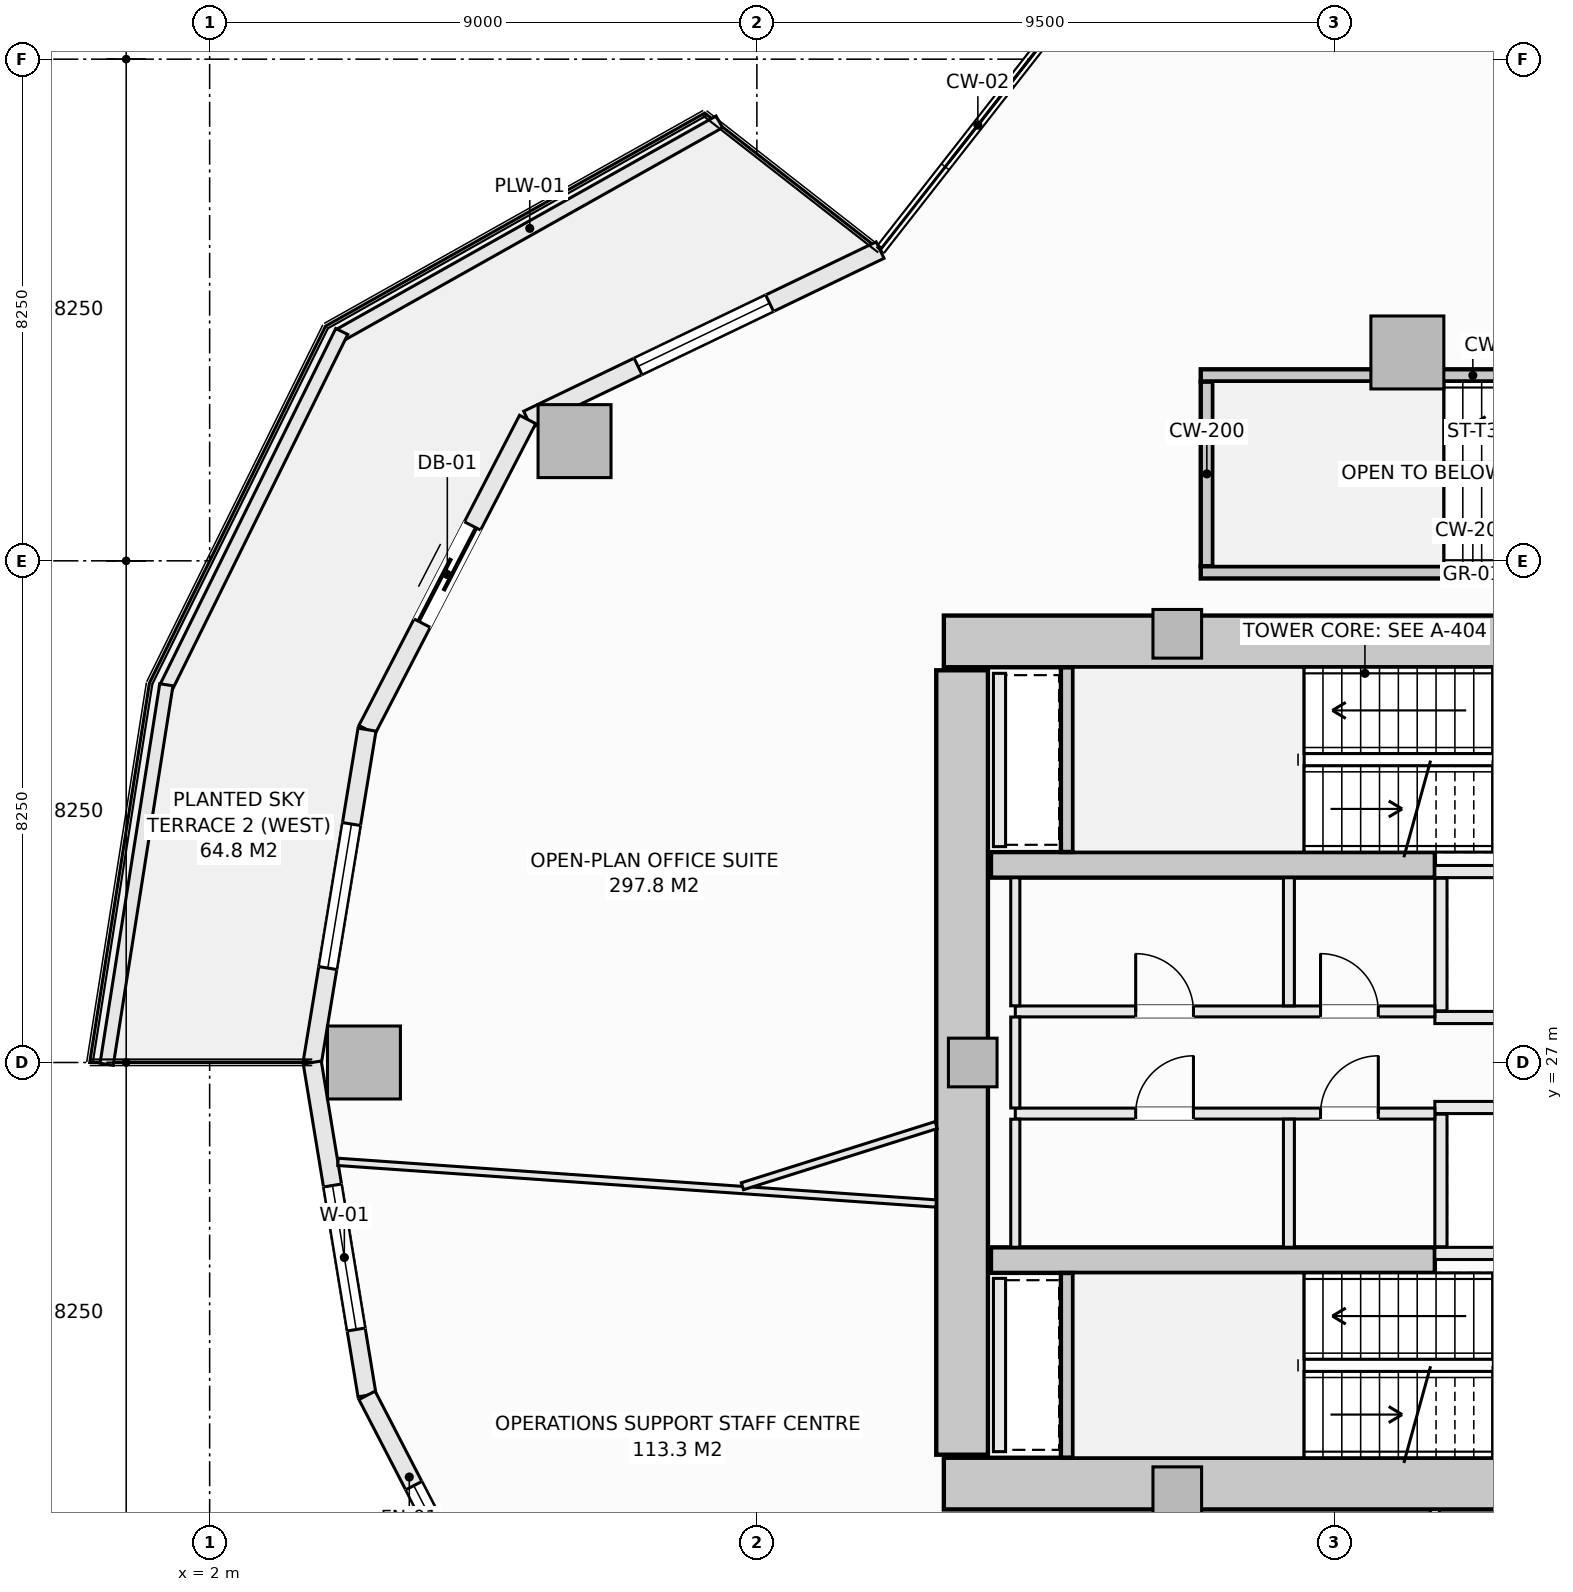
"""IFC4 building model, lengths in metres.
Left out: names, types, materials, properties, quantities, classifications, styles, units other than length and angle.
Written with IfcOpenShell. Run it as: python <this file> out.ifc"""

import sys

from ifc_helpers import new_model, si_unit, direction, frame, frame_2d, origin, origin_2d, place, context, subcontext, project, spatial, rectangle, extrude, element, fill, save


model = new_model("IFC4")
c1 = context("Model", 3, precision=1e-05, world=origin(), true_north=direction((0.0, 1.0)))
c2 = subcontext(c1, "Body", "Model", "MODEL_VIEW")
j1 = project(units=[si_unit("LENGTHUNIT", "METRE"), si_unit("PLANEANGLEUNIT", "RADIAN")], contexts=[c1])
p1 = place(None, origin())
s1 = spatial("IfcSite", under=j1, at=p1, CompositionType="ELEMENT")
p2 = place(p1, origin())
s2 = spatial("IfcBuilding", under=s1, at=p2, CompositionType="ELEMENT")
p3 = place(p2, frame((0.0, 0.0, 84.25)))
s3 = spatial("IfcBuildingStorey", under=s2, at=p3, CompositionType="ELEMENT", Elevation=84.25)
for number, where, z_axis, x_axis in (
    (1, (14.075, 33.925, -0.28), (0.0, 0.0, 1.0), (1.0, 0.0, 0.0)),
    (2, (14.075, 20.075, -0.28), (0.0, 0.0, 1.0), (1.0, 0.0, 0.0)),
):
    element("IfcWall", number, at=place(p3, frame(where, z_axis=z_axis, x_axis=x_axis)), inside=s3, PredefinedType="SHEAR", context=c2, shape_type="SweptSolid", body=[
        extrude(rectangle(XDim=13.85, YDim=0.85, at=frame_2d((6.925, 0.0))), origin(), (0.0, 0.0, 1.0), 3.85),
    ])
p4 = place(p3, frame((14.375, 20.55, -0.28), z_axis=(0.0, 0.0, 1.0), x_axis=(0.0, 1.0, 0.0)))
e3 = element("IfcWall", 3, at=p4, inside=s3, PredefinedType="SHEAR", context=c2, shape_type="SweptSolid", body=[
    extrude(rectangle(XDim=12.9, YDim=0.85, at=frame_2d((6.45, 0.0))), origin(), (0.0, 0.0, 1.0), 3.85),
])
for number, where, z_axis, x_axis in (
    (4, (14.85, 30.25, -0.28), (0.0, 0.0, 1.0), (1.0, 0.0, 0.0)),
    (5, (14.85, 23.75, -0.28), (0.0, 0.0, 1.0), (1.0, 0.0, 0.0)),
):
    element("IfcWall", number, at=place(p3, frame(where, z_axis=z_axis, x_axis=x_axis)), inside=s3, PredefinedType="SHEAR", context=c2, shape_type="SweptSolid", body=[
        extrude(rectangle(XDim=7.3, YDim=0.42, at=frame_2d((3.65, 0.0))), origin(), (0.0, 0.0, 1.0), 3.85),
    ])
for number, where, z_axis, x_axis in (
    (6, (8.001, 37.219, -0.28), (0.0, 0.0, 1.0), (1.0, 0.0, 0.0)),
    (7, (4.538, 27.0, -0.28), (0.0, 0.0, 1.0), (1.0, 0.0, 0.0)),
    (8, (21.698, 38.677, -0.28), (0.0, 0.0, 1.0), (1.0, 0.0, 0.0)),
):
    element("IfcColumn", number, at=place(p3, frame(where, z_axis=z_axis, x_axis=x_axis)), inside=s3, PredefinedType="COLUMN", context=c2, shape_type="SweptSolid", body=[
        extrude(rectangle(XDim=1.2, YDim=1.2, at=origin_2d()), origin(), (0.0, 0.0, 1.0), 3.85),
    ])
for number, where, z_axis, x_axis in (
    (9, (17.914, 34.05, -0.28), (0.0, 0.0, 1.0), (1.0, 0.0, 0.0)),
    (10, (14.55, 27.0, -0.28), (0.0, 0.0, 1.0), (1.0, 0.0, 0.0)),
    (11, (17.914, 19.95, -0.28), (0.0, 0.0, 1.0), (1.0, 0.0, 0.0)),
):
    element("IfcColumn", number, at=place(p3, frame(where, z_axis=z_axis, x_axis=x_axis)), inside=s3, PredefinedType="PILASTER", context=c2, shape_type="SweptSolid", body=[
        extrude(rectangle(XDim=0.8, YDim=0.8, at=origin_2d()), origin(), (0.0, 0.0, 1.0), 3.85),
    ])
p5 = place(p3, frame((7.229, 37.575, 0.0), z_axis=(0.0, 0.0, 1.0), x_axis=(0.901354747727, 0.433081538224, 0.0)))
e12 = element("IfcWall", 12, at=p5, inside=s3, PredefinedType="SOLIDWALL", context=c2, shape_type="SweptSolid", body=[
    extrude(rectangle(XDim=6.431, YDim=0.3, at=frame_2d((3.215, 0.0))), origin(), (0.0, 0.0, 1.0), 3.093),
])
p6 = place(p5, frame((2.015, 0.0, 0.85)))
e13 = element("IfcOpeningElement", 13, at=p6, cuts=e12, PredefinedType="OPENING", context=c2, shape_type="SweptSolid", body=[
    extrude(rectangle(XDim=2.4, YDim=1.9, at=frame_2d((1.2, 0.95))), frame((0.0, 0.16, 0.0), z_axis=(0.0, -1.0, 0.0), x_axis=(1.0, 0.0, 0.0)), (0.0, 0.0, 1.0), 0.32),
])
p7 = place(p3, frame((4.588, 32.474, 0.0), z_axis=(0.0, 0.0, 1.0), x_axis=(0.459800981414, 0.888021991558, 0.0)))
e14 = element("IfcWall", 14, at=p7, inside=s3, PredefinedType="SOLIDWALL", context=c2, shape_type="SweptSolid", body=[
    extrude(rectangle(XDim=5.744, YDim=0.3, at=frame_2d((2.872, 0.0))), origin(), (0.0, 0.0, 1.0), 3.093),
])
p8 = place(p7, frame((1.972, 0.0, 0.0)))
e15 = element("IfcOpeningElement", 15, at=p8, cuts=e14, PredefinedType="OPENING", context=c2, shape_type="SweptSolid", body=[
    extrude(rectangle(XDim=1.8, YDim=2.25, at=frame_2d((0.9, 1.125))), frame((0.0, 0.16, 0.0), z_axis=(0.0, -1.0, 0.0), x_axis=(1.0, 0.0, 0.0)), (0.0, 0.0, 1.0), 0.32),
])
p9 = place(p3, frame((3.688, 27.0, 0.0), z_axis=(0.0, 0.0, 1.0), x_axis=(0.162386212206, 0.986727276447, 0.0)))
e16 = element("IfcWall", 16, at=p9, inside=s3, PredefinedType="SOLIDWALL", context=c2, shape_type="SweptSolid", body=[
    extrude(rectangle(XDim=5.548, YDim=0.3, at=frame_2d((2.774, 0.0))), origin(), (0.0, 0.0, 1.0), 3.093),
])
p10 = place(p9, frame((1.574, 0.0, 0.85)))
e17 = element("IfcOpeningElement", 17, at=p10, cuts=e16, PredefinedType="OPENING", context=c2, shape_type="SweptSolid", body=[
    extrude(rectangle(XDim=2.4, YDim=1.9, at=frame_2d((1.2, 0.95))), frame((0.0, 0.16, 0.0), z_axis=(0.0, -1.0, 0.0), x_axis=(1.0, 0.0, 0.0)), (0.0, 0.0, 1.0), 0.32),
])
p11 = place(p3, frame((3.688, 27.0, 0.0), z_axis=(0.0, 0.0, 1.0), x_axis=(0.162386212206, -0.986727276447, 0.0)))
e18 = element("IfcWall", 18, at=p11, inside=s3, PredefinedType="SOLIDWALL", context=c2, shape_type="SweptSolid", body=[
    extrude(rectangle(XDim=5.548, YDim=0.3, at=frame_2d((2.774, 0.0))), origin(), (0.0, 0.0, 1.0), 3.093),
])
p12 = place(p11, frame((2.05, 0.0, 0.85)))
e19 = element("IfcOpeningElement", 19, at=p12, cuts=e18, PredefinedType="OPENING", context=c2, shape_type="SweptSolid", body=[
    extrude(rectangle(XDim=2.4, YDim=1.9, at=frame_2d((1.2, 0.95))), frame((0.0, 0.16, 0.0), z_axis=(0.0, -1.0, 0.0), x_axis=(1.0, 0.0, 0.0)), (0.0, 0.0, 1.0), 0.32),
])
p13 = place(p3, frame((4.588, 21.526, 0.0), z_axis=(0.0, 0.0, 1.0), x_axis=(0.459800981414, -0.888021991558, 0.0)))
e20 = element("IfcWall", 20, at=p13, inside=s3, PredefinedType="SOLIDWALL", context=c2, shape_type="SweptSolid", body=[
    extrude(rectangle(XDim=5.744, YDim=0.3, at=frame_2d((2.872, 0.0))), origin(), (0.0, 0.0, 1.0), 3.093),
])
p14 = place(p13, frame((1.672, 0.0, 0.85)))
e21 = element("IfcOpeningElement", 21, at=p14, cuts=e20, PredefinedType="OPENING", context=c2, shape_type="SweptSolid", body=[
    extrude(rectangle(XDim=2.4, YDim=1.9, at=frame_2d((1.2, 0.95))), frame((0.0, 0.16, 0.0), z_axis=(0.0, -1.0, 0.0), x_axis=(1.0, 0.0, 0.0)), (0.0, 0.0, 1.0), 0.32),
])
p15 = place(p3, frame((4.147, 38.966, 0.0), z_axis=(0.0, 0.0, 1.0), x_axis=(0.871775109335, 0.489906275468, 0.0)))
e22 = element("IfcWall", 22, at=p15, inside=s3, PredefinedType="PARAPET", context=c2, shape_type="SweptSolid", body=[
    extrude(rectangle(XDim=7.152, YDim=0.22, at=frame_2d((3.576, 0.0))), origin(), (0.0, 0.0, 1.0), 0.52),
])
p16 = place(p3, frame((1.275, 33.153, 0.0), z_axis=(0.0, 0.0, 1.0), x_axis=(0.442686636348, 0.89667638644, 0.0)))
e23 = element("IfcWall", 23, at=p16, inside=s3, PredefinedType="PARAPET", context=c2, shape_type="SweptSolid", body=[
    extrude(rectangle(XDim=6.545, YDim=0.22, at=frame_2d((3.272, 0.0))), origin(), (0.0, 0.0, 1.0), 0.52),
])
p17 = place(p3, frame((0.306, 26.971, 0.0), z_axis=(0.0, 0.0, 1.0), x_axis=(0.15545655238, 0.987842730561, 0.0)))
e24 = element("IfcWall", 24, at=p17, inside=s3, PredefinedType="PARAPET", context=c2, shape_type="SweptSolid", body=[
    extrude(rectangle(XDim=6.318, YDim=0.22, at=frame_2d((3.159, 0.0))), origin(), (0.0, 0.0, 1.0), 0.52),
])
for number, where, z_axis, x_axis in (
    (25, (16.1, 30.462, -0.28), (0.0, 0.0, 1.0), (0.0, 1.0, 0.0)),
    (26, (16.1, 20.502, -0.28), (0.0, 0.0, 1.0), (0.0, 1.0, 0.0)),
):
    element("IfcWall", number, at=place(p3, frame(where, z_axis=z_axis, x_axis=x_axis)), inside=s3, PredefinedType="SHEAR", context=c2, shape_type="SweptSolid", body=[
        extrude(rectangle(XDim=3.036, YDim=0.2, at=frame_2d((1.518, 0.0))), origin(), (0.0, 0.0, 1.0), 3.85),
    ])
p18 = place(p3, frame((18.4, 35.16, -0.28), z_axis=(0.0, 0.0, 1.0), x_axis=(0.0, 1.0, 0.0)))
e27 = element("IfcWall", 27, at=p18, inside=s3, PredefinedType="SHEAR", context=c2, shape_type="SweptSolid", body=[
    extrude(rectangle(XDim=3.04, YDim=0.2, at=frame_2d((1.52, 0.0))), origin(), (0.0, 0.0, 1.0), 3.85),
])
for number, where, z_axis, x_axis in (
    (28, (18.3, 38.3, -0.28), (0.0, 0.0, 1.0), (1.0, 0.0, 0.0)),
    (29, (18.3, 35.06, -0.28), (0.0, 0.0, 1.0), (1.0, 0.0, 0.0)),
):
    element("IfcWall", number, at=place(p3, frame(where, z_axis=z_axis, x_axis=x_axis)), inside=s3, PredefinedType="SHEAR", context=c2, shape_type="SweptSolid", body=[
        extrude(rectangle(XDim=8.95, YDim=0.2, at=frame_2d((4.475, 0.0))), origin(), (0.0, 0.0, 1.0), 3.85),
    ])
for number, where, z_axis, x_axis in (
    (30, (22.15, 30.14, 0.0), (0.0, 0.0, 1.0), (1.0, 0.0, 0.0)),
    (31, (22.15, 27.74, 0.0), (0.0, 0.0, 1.0), (1.0, 0.0, 0.0)),
):
    element("IfcWall", number, at=place(p3, frame(where, z_axis=z_axis, x_axis=x_axis)), inside=s3, PredefinedType="SOLIDWALL", context=c2, shape_type="SweptSolid", body=[
        extrude(rectangle(XDim=2.45, YDim=0.2, at=frame_2d((1.225, 0.0))), origin(), (0.0, 0.0, 1.0), 3.57),
    ])
p19 = place(p3, frame((22.25, 27.85, 0.0), z_axis=(0.0, 0.0, 1.0), x_axis=(0.0, 1.0, 0.0)))
e32 = element("IfcWall", 32, at=p19, inside=s3, PredefinedType="SOLIDWALL", context=c2, shape_type="SweptSolid", body=[
    extrude(rectangle(XDim=2.18, YDim=0.2, at=frame_2d((1.09, 0.0))), origin(), (0.0, 0.0, 1.0), 3.57),
])
for number, where, z_axis, x_axis in (
    (33, (22.15, 26.26, 0.0), (0.0, 0.0, 1.0), (1.0, 0.0, 0.0)),
    (34, (22.15, 23.86, 0.0), (0.0, 0.0, 1.0), (1.0, 0.0, 0.0)),
):
    element("IfcWall", number, at=place(p3, frame(where, z_axis=z_axis, x_axis=x_axis)), inside=s3, PredefinedType="SOLIDWALL", context=c2, shape_type="SweptSolid", body=[
        extrude(rectangle(XDim=2.45, YDim=0.2, at=frame_2d((1.225, 0.0))), origin(), (0.0, 0.0, 1.0), 3.57),
    ])
p20 = place(p3, frame((22.25, 23.97, 0.0), z_axis=(0.0, 0.0, 1.0), x_axis=(0.0, 1.0, 0.0)))
e35 = element("IfcWall", 35, at=p20, inside=s3, PredefinedType="SOLIDWALL", context=c2, shape_type="SweptSolid", body=[
    extrude(rectangle(XDim=2.18, YDim=0.2, at=frame_2d((1.09, 0.0))), origin(), (0.0, 0.0, 1.0), 3.57),
])
for number, where, z_axis, x_axis in (
    (36, (14.99, 30.55, 0.0), (0.0, 0.0, 1.0), (0.0, 1.0, 0.0)),
    (37, (14.99, 20.6, 0.0), (0.0, 0.0, 1.0), (0.0, 1.0, 0.0)),
):
    element("IfcWall", number, at=place(p3, frame(where, z_axis=z_axis, x_axis=x_axis)), inside=s3, PredefinedType="SOLIDWALL", context=c2, shape_type="SweptSolid", body=[
        extrude(rectangle(XDim=2.85, YDim=0.2, at=frame_2d((1.425, 0.0))), origin(), (0.0, 0.0, 1.0), 3.57),
    ])
p21 = place(p3, frame((15.25, 27.84, 0.0), z_axis=(0.0, 0.0, 1.0), x_axis=(1.0, 0.0, 0.0)))
e38 = element("IfcWall", 38, at=p21, inside=s3, PredefinedType="SOLIDWALL", context=c2, shape_type="SweptSolid", body=[
    extrude(rectangle(XDim=6.9, YDim=0.18, at=frame_2d((3.45, 0.0))), origin(), (0.0, 0.0, 1.0), 3.57),
])
p22 = place(p21, frame((5.02, 0.0, 0.0)))
e39 = element("IfcOpeningElement", 39, at=p22, cuts=e38, PredefinedType="OPENING", context=c2, shape_type="SweptSolid", body=[
    extrude(rectangle(XDim=0.95, YDim=2.1, at=frame_2d((0.475, 1.05))), frame((0.0, 0.1, 0.0), z_axis=(0.0, -1.0, 0.0), x_axis=(1.0, 0.0, 0.0)), (0.0, 0.0, 1.0), 0.2),
])
p23 = place(p21, frame((1.98, 0.0, 0.0)))
e40 = element("IfcOpeningElement", 40, at=p23, cuts=e38, PredefinedType="OPENING", context=c2, shape_type="SweptSolid", body=[
    extrude(rectangle(XDim=0.95, YDim=2.1, at=frame_2d((0.475, 1.05))), frame((0.0, 0.1, 0.0), z_axis=(0.0, -1.0, 0.0), x_axis=(1.0, 0.0, 0.0)), (0.0, 0.0, 1.0), 0.2),
])
p24 = place(p3, frame((15.25, 26.16, 0.0), z_axis=(0.0, 0.0, 1.0), x_axis=(1.0, 0.0, 0.0)))
e41 = element("IfcWall", 41, at=p24, inside=s3, PredefinedType="SOLIDWALL", context=c2, shape_type="SweptSolid", body=[
    extrude(rectangle(XDim=6.9, YDim=0.18, at=frame_2d((3.45, 0.0))), origin(), (0.0, 0.0, 1.0), 3.57),
])
p25 = place(p24, frame((5.02, 0.0, 0.0)))
e42 = element("IfcOpeningElement", 42, at=p25, cuts=e41, PredefinedType="OPENING", context=c2, shape_type="SweptSolid", body=[
    extrude(rectangle(XDim=0.95, YDim=2.1, at=frame_2d((0.475, 1.05))), frame((0.0, 0.1, 0.0), z_axis=(0.0, -1.0, 0.0), x_axis=(1.0, 0.0, 0.0)), (0.0, 0.0, 1.0), 0.2),
])
p26 = place(p24, frame((1.98, 0.0, 0.0)))
e43 = element("IfcOpeningElement", 43, at=p26, cuts=e41, PredefinedType="OPENING", context=c2, shape_type="SweptSolid", body=[
    extrude(rectangle(XDim=0.95, YDim=2.1, at=frame_2d((0.475, 1.05))), frame((0.0, 0.1, 0.0), z_axis=(0.0, -1.0, 0.0), x_axis=(1.0, 0.0, 0.0)), (0.0, 0.0, 1.0), 0.2),
])
p27 = place(p3, frame((15.25, 23.962, 0.0), z_axis=(0.0, 0.0, 1.0), x_axis=(0.0, 1.0, 0.0)))
e44 = element("IfcWall", 44, at=p27, inside=s3, PredefinedType="PARTITIONING", context=c2, shape_type="SweptSolid", body=[
    extrude(rectangle(XDim=2.106, YDim=0.15, at=frame_2d((1.053, 0.0))), origin(), (0.0, 0.0, 1.0), 3.57),
])
p28 = place(p3, frame((15.25, 26.252, 0.0), z_axis=(0.0, 0.0, 1.0), x_axis=(0.0, 1.0, 0.0)))
e45 = element("IfcWall", 45, at=p28, inside=s3, PredefinedType="PARTITIONING", context=c2, shape_type="SweptSolid", body=[
    extrude(rectangle(XDim=1.496, YDim=0.15, at=frame_2d((0.748, 0.0))), origin(), (0.0, 0.0, 1.0), 3.57),
])
p29 = place(p3, frame((15.25, 27.932, 0.0), z_axis=(0.0, 0.0, 1.0), x_axis=(0.0, 1.0, 0.0)))
e46 = element("IfcWall", 46, at=p29, inside=s3, PredefinedType="PARTITIONING", context=c2, shape_type="SweptSolid", body=[
    extrude(rectangle(XDim=2.106, YDim=0.15, at=frame_2d((1.053, 0.0))), origin(), (0.0, 0.0, 1.0), 3.57),
])
for number, where, z_axis, x_axis in (
    (47, (19.75, 23.962, 0.0), (0.0, 0.0, 1.0), (0.0, 1.0, 0.0)),
    (48, (19.75, 27.932, 0.0), (0.0, 0.0, 1.0), (0.0, 1.0, 0.0)),
):
    element("IfcWall", number, at=place(p3, frame(where, z_axis=z_axis, x_axis=x_axis)), inside=s3, PredefinedType="SOLIDWALL", context=c2, shape_type="SweptSolid", body=[
        extrude(rectangle(XDim=2.106, YDim=0.18, at=frame_2d((1.053, 0.0))), origin(), (0.0, 0.0, 1.0), 3.57),
    ])
p30 = place(p3, frame((22.15, 17.127, 0.0), z_axis=(0.0, 0.0, 1.0), x_axis=(0.0, 1.0, 0.0)))
e49 = element("IfcWall", 49, at=p30, inside=s3, PredefinedType="PARTITIONING", context=c2, shape_type="SweptSolid", body=[
    extrude(rectangle(XDim=2.521, YDim=0.15, at=frame_2d((1.26, 0.0))), origin(), (0.0, 0.0, 1.0), 3.57),
])
p31 = place(p3, frame((4.11, 25.366, 0.0), z_axis=(0.0, 0.0, 1.0), x_axis=(0.997584166379, -0.069468201287, 0.0)))
e50 = element("IfcWall", 50, at=p31, inside=s3, PredefinedType="PARTITIONING", context=c2, shape_type="SweptSolid", body=[
    extrude(rectangle(XDim=9.862, YDim=0.12, at=frame_2d((4.931, 0.0))), origin(), (0.0, 0.0, 1.0), 3.57),
])
p32 = place(p3, frame((10.762, 24.965, 0.0), z_axis=(0.0, 0.0, 1.0), x_axis=(0.953640082092, 0.300949487168, 0.0)))
e51 = element("IfcWall", 51, at=p32, inside=s3, PredefinedType="PARTITIONING", context=c2, shape_type="SweptSolid", body=[
    extrude(rectangle(XDim=3.341, YDim=0.12, at=frame_2d((1.67, 0.0))), origin(), (0.0, 0.0, 1.0), 3.57),
])
p33 = place(p3, frame((18.06, 45.538, 0.0), z_axis=(0.0, 0.0, 1.0), x_axis=(0.940354559933, -0.340195975304, 0.0)))
e52 = element("IfcWall", 52, at=p33, inside=s3, PredefinedType="PARTITIONING", context=c2, shape_type="SweptSolid", body=[
    extrude(rectangle(XDim=28.53, YDim=0.12, at=frame_2d((14.265, 0.0))), origin(), (0.0, 0.0, 1.0), 3.093),
])
p34 = place(p6, origin())
e53 = element("IfcWindow", 53, at=p34, inside=s3, PartitioningType="SINGLE_PANEL", PredefinedType="WINDOW", context=c2, shape_type="SweptSolid", body=[
    extrude(rectangle(XDim=2.4, YDim=1.9, at=frame_2d((1.2, 0.95))), frame((0.0, 0.03, 0.0), z_axis=(0.0, -1.0, 0.0), x_axis=(1.0, 0.0, 0.0)), (0.0, 0.0, 1.0), 0.06),
])
fill(e13, e53)
p35 = place(p8, origin())
e54 = element("IfcDoor", 54, at=p35, inside=s3, OperationType="SLIDING_TO_LEFT", PredefinedType="DOOR", context=c2, shape_type="SweptSolid", body=[
    extrude(rectangle(XDim=1.8, YDim=2.25, at=frame_2d((0.9, 1.125))), frame((0.0, 0.025, 0.0), z_axis=(0.0, -1.0, 0.0), x_axis=(1.0, 0.0, 0.0)), (0.0, 0.0, 1.0), 0.05),
])
fill(e15, e54)
p36 = place(p10, origin())
e55 = element("IfcWindow", 55, at=p36, inside=s3, PartitioningType="SINGLE_PANEL", PredefinedType="WINDOW", context=c2, shape_type="SweptSolid", body=[
    extrude(rectangle(XDim=2.4, YDim=1.9, at=frame_2d((1.2, 0.95))), frame((0.0, 0.03, 0.0), z_axis=(0.0, -1.0, 0.0), x_axis=(1.0, 0.0, 0.0)), (0.0, 0.0, 1.0), 0.06),
])
fill(e17, e55)
p37 = place(p12, origin())
e56 = element("IfcWindow", 56, at=p37, inside=s3, PartitioningType="SINGLE_PANEL", PredefinedType="WINDOW", context=c2, shape_type="SweptSolid", body=[
    extrude(rectangle(XDim=2.4, YDim=1.9, at=frame_2d((1.2, 0.95))), frame((0.0, 0.03, 0.0), z_axis=(0.0, -1.0, 0.0), x_axis=(1.0, 0.0, 0.0)), (0.0, 0.0, 1.0), 0.06),
])
fill(e19, e56)
p38 = place(p14, origin())
e57 = element("IfcWindow", 57, at=p38, inside=s3, PartitioningType="SINGLE_PANEL", PredefinedType="WINDOW", context=c2, shape_type="SweptSolid", body=[
    extrude(rectangle(XDim=2.4, YDim=1.9, at=frame_2d((1.2, 0.95))), frame((0.0, 0.03, 0.0), z_axis=(0.0, -1.0, 0.0), x_axis=(1.0, 0.0, 0.0)), (0.0, 0.0, 1.0), 0.06),
])
fill(e21, e57)
p39 = place(p22, origin())
e58 = element("IfcDoor", 58, at=p39, inside=s3, OperationType="SINGLE_SWING_LEFT", PredefinedType="DOOR", context=c2, shape_type="SweptSolid", body=[
    extrude(rectangle(XDim=0.95, YDim=2.1, at=frame_2d((0.475, 1.05))), frame((0.0, 0.025, 0.0), z_axis=(0.0, -1.0, 0.0), x_axis=(1.0, 0.0, 0.0)), (0.0, 0.0, 1.0), 0.05),
])
fill(e39, e58)
p40 = place(p25, origin())
e59 = element("IfcDoor", 59, at=p40, inside=s3, OperationType="SINGLE_SWING_RIGHT", PredefinedType="DOOR", context=c2, shape_type="SweptSolid", body=[
    extrude(rectangle(XDim=0.95, YDim=2.1, at=frame_2d((0.475, 1.05))), frame((0.0, 0.025, 0.0), z_axis=(0.0, -1.0, 0.0), x_axis=(1.0, 0.0, 0.0)), (0.0, 0.0, 1.0), 0.05),
])
fill(e42, e59)
p41 = place(p23, origin())
e60 = element("IfcDoor", 60, at=p41, inside=s3, OperationType="SINGLE_SWING_LEFT", PredefinedType="DOOR", context=c2, shape_type="SweptSolid", body=[
    extrude(rectangle(XDim=0.95, YDim=2.1, at=frame_2d((0.475, 1.05))), frame((0.0, 0.025, 0.0), z_axis=(0.0, -1.0, 0.0), x_axis=(1.0, 0.0, 0.0)), (0.0, 0.0, 1.0), 0.05),
])
fill(e40, e60)
p42 = place(p26, origin())
e61 = element("IfcDoor", 61, at=p42, inside=s3, OperationType="SINGLE_SWING_RIGHT", PredefinedType="DOOR", context=c2, shape_type="SweptSolid", body=[
    extrude(rectangle(XDim=0.95, YDim=2.1, at=frame_2d((0.475, 1.05))), frame((0.0, 0.025, 0.0), z_axis=(0.0, -1.0, 0.0), x_axis=(1.0, 0.0, 0.0)), (0.0, 0.0, 1.0), 0.05),
])
fill(e43, e61)
save(model, sys.argv[1])
